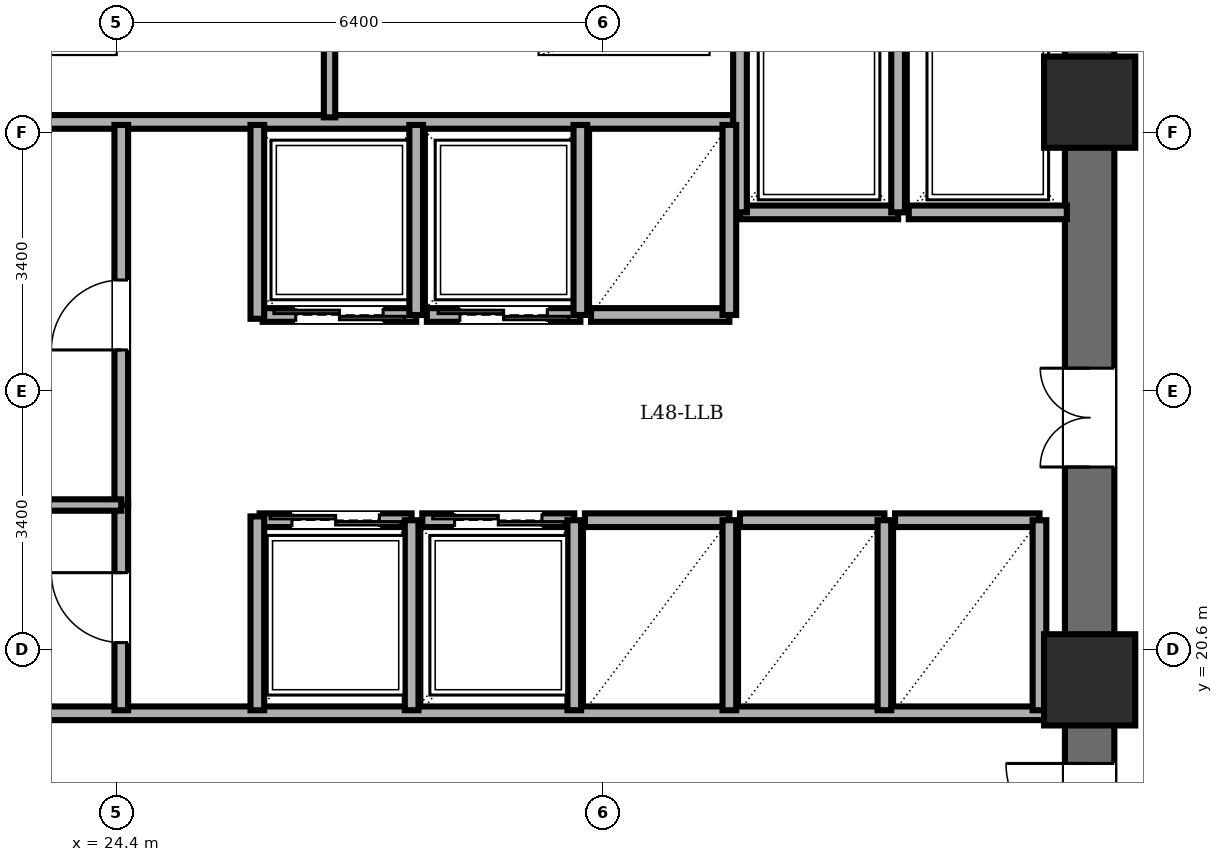
"""IFC4 building model, lengths in metres.
Left out: names, types, materials, properties, quantities, classifications, styles, units other than length and angle.
Written with IfcOpenShell. Run it as: python <this file> out.ifc"""

import sys

from ifc_helpers import new_model, si_unit, direction, frame, frame_2d, origin, origin_2d, place, context, subcontext, project, spatial, rectangle, extrude, element, fill, save


model = new_model("IFC4")
c1 = context("Model", 3, precision=1e-05, world=origin(), true_north=direction((0.0, 1.0)))
c2 = subcontext(c1, "Body", "Model", "MODEL_VIEW")
j1 = project(units=[si_unit("LENGTHUNIT", "METRE"), si_unit("PLANEANGLEUNIT", "RADIAN")], contexts=[c1])
p1 = place(None, origin())
s1 = spatial("IfcSite", under=j1, at=p1, CompositionType="ELEMENT")
p2 = place(p1, origin())
s2 = spatial("IfcBuilding", under=s1, at=p2, CompositionType="ELEMENT")
p3 = place(p2, frame((0.0, 0.0, 183.4)))
s3 = spatial("IfcBuildingStorey", under=s2, at=p3, CompositionType="ELEMENT", Elevation=183.4)
for number, where, z_axis, x_axis in (
    (1, (37.2, 20.2, 0.0), (0.0, 0.0, 1.0), (1.0, 0.0, 0.0)),
    (2, (37.2, 27.8, 0.0), (0.0, 0.0, 1.0), (1.0, 0.0, 0.0)),
):
    element("IfcColumn", number, at=place(p3, frame(where, z_axis=z_axis, x_axis=x_axis)), inside=s3, PredefinedType="COLUMN", context=c2, shape_type="SweptSolid", body=[
        extrude(rectangle(XDim=1.2, YDim=1.2, at=origin_2d()), origin(), (0.0, 0.0, 1.0), 3.6),
    ])
p4 = place(p3, frame((37.2, 14.4, 0.0), z_axis=(0.0, 0.0, 1.0), x_axis=(0.0, 1.0, 0.0)))
e3 = element("IfcWall", 3, at=p4, inside=s3, PredefinedType="SHEAR", context=c2, shape_type="SweptSolid", body=[
    extrude(rectangle(XDim=19.2, YDim=0.65, at=frame_2d((9.6, 0.0))), origin(), (0.0, 0.0, 1.0), 3.4),
])
p5 = place(p4, frame((15.8, 0.0, 0.0)))
e4 = element("IfcOpeningElement", 4, at=p5, cuts=e3, PredefinedType="OPENING", context=c2, shape_type="SweptSolid", body=[
    extrude(rectangle(XDim=1.15, YDim=2.15, at=frame_2d((0.575, 1.075))), frame((0.0, 0.335, 0.0), z_axis=(0.0, -1.0, 0.0), x_axis=(1.0, 0.0, 0.0)), (0.0, 0.0, 1.0), 0.67),
])
p6 = place(p4, frame((3.6, 0.0, 0.0)))
e5 = element("IfcOpeningElement", 5, at=p6, cuts=e3, PredefinedType="OPENING", context=c2, shape_type="SweptSolid", body=[
    extrude(rectangle(XDim=1.1, YDim=2.15, at=frame_2d((0.55, 1.075))), frame((0.0, 0.335, 0.0), z_axis=(0.0, -1.0, 0.0), x_axis=(1.0, 0.0, 0.0)), (0.0, 0.0, 1.0), 0.67),
])
p7 = place(p4, frame((8.6, 0.0, 0.0)))
e6 = element("IfcOpeningElement", 6, at=p7, cuts=e3, PredefinedType="OPENING", context=c2, shape_type="SweptSolid", body=[
    extrude(rectangle(XDim=1.3, YDim=2.2, at=frame_2d((0.65, 1.1))), frame((0.0, 0.335, 0.0), z_axis=(0.0, -1.0, 0.0), x_axis=(1.0, 0.0, 0.0)), (0.0, 0.0, 1.0), 0.67),
])
p8 = place(p3, frame((21.95, 27.54, 0.0), z_axis=(0.0, 0.0, 1.0), x_axis=(1.0, 0.0, 0.0)))
e7 = element("IfcWall", 7, at=p8, inside=s3, PredefinedType="PARTITIONING", context=c2, shape_type="SweptSolid", body=[
    extrude(rectangle(XDim=10.56, YDim=0.18, at=frame_2d((5.28, 0.0))), origin(), (0.0, 0.0, 1.0), 3.4),
])
p9 = place(p3, frame((27.2, 27.6, 0.0), z_axis=(0.0, 0.0, 1.0), x_axis=(0.0, 1.0, 0.0)))
e8 = element("IfcWall", 8, at=p9, inside=s3, PredefinedType="PARTITIONING", context=c2, shape_type="SweptSolid", body=[
    extrude(rectangle(XDim=1.52, YDim=0.15, at=frame_2d((0.76, 0.0))), origin(), (0.0, 0.0, 1.0), 3.4),
])
p10 = place(p3, frame((21.95, 19.76, 0.0), z_axis=(0.0, 0.0, 1.0), x_axis=(1.0, 0.0, 0.0)))
e9 = element("IfcWall", 9, at=p10, inside=s3, PredefinedType="PARTITIONING", context=c2, shape_type="SweptSolid", body=[
    extrude(rectangle(XDim=14.87, YDim=0.18, at=frame_2d((7.435, 0.0))), origin(), (0.0, 0.0, 1.0), 3.4),
])
p11 = place(p3, frame((34.68, 26.35, 0.0), z_axis=(0.0, 0.0, 1.0), x_axis=(-1.0, 0.0, 0.0)))
e10 = element("IfcWall", 10, at=p11, inside=s3, PredefinedType="PARTITIONING", context=c2, shape_type="SweptSolid", body=[
    extrude(rectangle(XDim=2.08, YDim=0.18, at=frame_2d((1.04, 0.0))), origin(), (0.0, 0.0, 1.0), 3.4),
])
for number, where, z_axis, x_axis in (
    (11, (34.68, 26.35, 0.0), (0.0, 0.0, 1.0), (0.0, 1.0, 0.0)),
    (12, (32.6, 29.08, 0.0), (0.0, 0.0, 1.0), (0.0, -1.0, 0.0)),
):
    element("IfcWall", number, at=place(p3, frame(where, z_axis=z_axis, x_axis=x_axis)), inside=s3, PredefinedType="PARTITIONING", context=c2, shape_type="SweptSolid", body=[
        extrude(rectangle(XDim=2.73, YDim=0.18, at=frame_2d((1.365, 0.0))), origin(), (0.0, 0.0, 1.0), 3.4),
    ])
p12 = place(p3, frame((36.9, 26.35, 0.0), z_axis=(0.0, 0.0, 1.0), x_axis=(-1.0, 0.0, 0.0)))
e13 = element("IfcWall", 13, at=p12, inside=s3, PredefinedType="PARTITIONING", context=c2, shape_type="SweptSolid", body=[
    extrude(rectangle(XDim=2.08, YDim=0.18, at=frame_2d((1.04, 0.0))), origin(), (0.0, 0.0, 1.0), 3.4),
])
p13 = place(p3, frame((28.34, 25.0, 0.0), z_axis=(0.0, 0.0, 1.0), x_axis=(-1.0, 0.0, 0.0)))
e14 = element("IfcWall", 14, at=p13, inside=s3, PredefinedType="PARTITIONING", context=c2, shape_type="SweptSolid", body=[
    extrude(rectangle(XDim=2.02, YDim=0.18, at=frame_2d((1.01, 0.0))), origin(), (0.0, 0.0, 1.0), 3.4),
])
p14 = place(p13, frame((0.435, 0.0, 0.0)))
e15 = element("IfcOpeningElement", 15, at=p14, cuts=e14, PredefinedType="OPENING", context=c2, shape_type="SweptSolid", body=[
    extrude(rectangle(XDim=1.15, YDim=2.2, at=frame_2d((0.575, 1.1))), frame((0.0, 0.1, 0.0), z_axis=(0.0, -1.0, 0.0), x_axis=(1.0, 0.0, 0.0)), (0.0, 0.0, 1.0), 0.2),
])
p15 = place(p3, frame((28.34, 25.0, 0.0), z_axis=(0.0, 0.0, 1.0), x_axis=(0.0, 1.0, 0.0)))
e16 = element("IfcWall", 16, at=p15, inside=s3, PredefinedType="PARTITIONING", context=c2, shape_type="SweptSolid", body=[
    extrude(rectangle(XDim=2.5, YDim=0.18, at=frame_2d((1.25, 0.0))), origin(), (0.0, 0.0, 1.0), 3.4),
])
p16 = place(p3, frame((30.5, 25.0, 0.0), z_axis=(0.0, 0.0, 1.0), x_axis=(-1.0, 0.0, 0.0)))
e17 = element("IfcWall", 17, at=p16, inside=s3, PredefinedType="PARTITIONING", context=c2, shape_type="SweptSolid", body=[
    extrude(rectangle(XDim=2.02, YDim=0.18, at=frame_2d((1.01, 0.0))), origin(), (0.0, 0.0, 1.0), 3.4),
])
p17 = place(p16, frame((0.435, 0.0, 0.0)))
e18 = element("IfcOpeningElement", 18, at=p17, cuts=e17, PredefinedType="OPENING", context=c2, shape_type="SweptSolid", body=[
    extrude(rectangle(XDim=1.15, YDim=2.2, at=frame_2d((0.575, 1.1))), frame((0.0, 0.1, 0.0), z_axis=(0.0, -1.0, 0.0), x_axis=(1.0, 0.0, 0.0)), (0.0, 0.0, 1.0), 0.2),
])
p18 = place(p3, frame((30.5, 25.0, 0.0), z_axis=(0.0, 0.0, 1.0), x_axis=(0.0, 1.0, 0.0)))
e19 = element("IfcWall", 19, at=p18, inside=s3, PredefinedType="PARTITIONING", context=c2, shape_type="SweptSolid", body=[
    extrude(rectangle(XDim=2.5, YDim=0.18, at=frame_2d((1.25, 0.0))), origin(), (0.0, 0.0, 1.0), 3.4),
])
p19 = place(p3, frame((26.28, 22.3, 0.0), z_axis=(0.0, 0.0, 1.0), x_axis=(1.0, 0.0, 0.0)))
e20 = element("IfcWall", 20, at=p19, inside=s3, PredefinedType="PARTITIONING", context=c2, shape_type="SweptSolid", body=[
    extrude(rectangle(XDim=2.0, YDim=0.18, at=frame_2d((1.0, 0.0))), origin(), (0.0, 0.0, 1.0), 3.4),
])
p20 = place(p19, frame((0.425, 0.0, 0.0)))
e21 = element("IfcOpeningElement", 21, at=p20, cuts=e20, PredefinedType="OPENING", context=c2, shape_type="SweptSolid", body=[
    extrude(rectangle(XDim=1.15, YDim=2.2, at=frame_2d((0.575, 1.1))), frame((0.0, 0.1, 0.0), z_axis=(0.0, -1.0, 0.0), x_axis=(1.0, 0.0, 0.0)), (0.0, 0.0, 1.0), 0.2),
])
p21 = place(p3, frame((28.28, 19.8, 0.0), z_axis=(0.0, 0.0, 1.0), x_axis=(0.0, 1.0, 0.0)))
e22 = element("IfcWall", 22, at=p21, inside=s3, PredefinedType="PARTITIONING", context=c2, shape_type="SweptSolid", body=[
    extrude(rectangle(XDim=2.5, YDim=0.18, at=frame_2d((1.25, 0.0))), origin(), (0.0, 0.0, 1.0), 3.4),
])
p22 = place(p3, frame((28.42, 22.3, 0.0), z_axis=(0.0, 0.0, 1.0), x_axis=(1.0, 0.0, 0.0)))
e23 = element("IfcWall", 23, at=p22, inside=s3, PredefinedType="PARTITIONING", context=c2, shape_type="SweptSolid", body=[
    extrude(rectangle(XDim=2.0, YDim=0.18, at=frame_2d((1.0, 0.0))), origin(), (0.0, 0.0, 1.0), 3.4),
])
p23 = place(p22, frame((0.425, 0.0, 0.0)))
e24 = element("IfcOpeningElement", 24, at=p23, cuts=e23, PredefinedType="OPENING", context=c2, shape_type="SweptSolid", body=[
    extrude(rectangle(XDim=1.15, YDim=2.2, at=frame_2d((0.575, 1.1))), frame((0.0, 0.1, 0.0), z_axis=(0.0, -1.0, 0.0), x_axis=(1.0, 0.0, 0.0)), (0.0, 0.0, 1.0), 0.2),
])
p24 = place(p3, frame((30.42, 19.8, 0.0), z_axis=(0.0, 0.0, 1.0), x_axis=(0.0, 1.0, 0.0)))
e25 = element("IfcWall", 25, at=p24, inside=s3, PredefinedType="PARTITIONING", context=c2, shape_type="SweptSolid", body=[
    extrude(rectangle(XDim=2.5, YDim=0.18, at=frame_2d((1.25, 0.0))), origin(), (0.0, 0.0, 1.0), 3.4),
])
p25 = place(p3, frame((32.46, 25.0, 0.0), z_axis=(0.0, 0.0, 1.0), x_axis=(-1.0, 0.0, 0.0)))
e26 = element("IfcWall", 26, at=p25, inside=s3, PredefinedType="PARTITIONING", context=c2, shape_type="SweptSolid", body=[
    extrude(rectangle(XDim=1.82, YDim=0.18, at=frame_2d((0.91, 0.0))), origin(), (0.0, 0.0, 1.0), 3.4),
])
p26 = place(p3, frame((32.46, 25.0, 0.0), z_axis=(0.0, 0.0, 1.0), x_axis=(0.0, 1.0, 0.0)))
e27 = element("IfcWall", 27, at=p26, inside=s3, PredefinedType="PARTITIONING", context=c2, shape_type="SweptSolid", body=[
    extrude(rectangle(XDim=2.5, YDim=0.18, at=frame_2d((1.25, 0.0))), origin(), (0.0, 0.0, 1.0), 3.4),
])
p27 = place(p3, frame((30.56, 22.3, 0.0), z_axis=(0.0, 0.0, 1.0), x_axis=(1.0, 0.0, 0.0)))
e28 = element("IfcWall", 28, at=p27, inside=s3, PredefinedType="PARTITIONING", context=c2, shape_type="SweptSolid", body=[
    extrude(rectangle(XDim=1.9, YDim=0.18, at=frame_2d((0.95, 0.0))), origin(), (0.0, 0.0, 1.0), 3.4),
])
p28 = place(p3, frame((32.46, 19.8, 0.0), z_axis=(0.0, 0.0, 1.0), x_axis=(0.0, 1.0, 0.0)))
e29 = element("IfcWall", 29, at=p28, inside=s3, PredefinedType="PARTITIONING", context=c2, shape_type="SweptSolid", body=[
    extrude(rectangle(XDim=2.5, YDim=0.18, at=frame_2d((1.25, 0.0))), origin(), (0.0, 0.0, 1.0), 3.4),
])
p29 = place(p3, frame((32.6, 22.3, 0.0), z_axis=(0.0, 0.0, 1.0), x_axis=(1.0, 0.0, 0.0)))
e30 = element("IfcWall", 30, at=p29, inside=s3, PredefinedType="PARTITIONING", context=c2, shape_type="SweptSolid", body=[
    extrude(rectangle(XDim=1.9, YDim=0.18, at=frame_2d((0.95, 0.0))), origin(), (0.0, 0.0, 1.0), 3.4),
])
p30 = place(p3, frame((34.5, 19.8, 0.0), z_axis=(0.0, 0.0, 1.0), x_axis=(0.0, 1.0, 0.0)))
e31 = element("IfcWall", 31, at=p30, inside=s3, PredefinedType="PARTITIONING", context=c2, shape_type="SweptSolid", body=[
    extrude(rectangle(XDim=2.5, YDim=0.18, at=frame_2d((1.25, 0.0))), origin(), (0.0, 0.0, 1.0), 3.4),
])
p31 = place(p3, frame((34.64, 22.3, 0.0), z_axis=(0.0, 0.0, 1.0), x_axis=(1.0, 0.0, 0.0)))
e32 = element("IfcWall", 32, at=p31, inside=s3, PredefinedType="PARTITIONING", context=c2, shape_type="SweptSolid", body=[
    extrude(rectangle(XDim=1.9, YDim=0.18, at=frame_2d((0.95, 0.0))), origin(), (0.0, 0.0, 1.0), 3.4),
])
p32 = place(p3, frame((36.54, 19.8, 0.0), z_axis=(0.0, 0.0, 1.0), x_axis=(0.0, 1.0, 0.0)))
e33 = element("IfcWall", 33, at=p32, inside=s3, PredefinedType="PARTITIONING", context=c2, shape_type="SweptSolid", body=[
    extrude(rectangle(XDim=2.5, YDim=0.18, at=frame_2d((1.25, 0.0))), origin(), (0.0, 0.0, 1.0), 3.4),
])
p33 = place(p3, frame((24.46, 22.5, 0.0), z_axis=(0.0, 0.0, 1.0), x_axis=(0.0, 1.0, 0.0)))
e34 = element("IfcWall", 34, at=p33, inside=s3, PredefinedType="PARTITIONING", context=c2, shape_type="SweptSolid", body=[
    extrude(rectangle(XDim=5.0, YDim=0.18, at=frame_2d((2.5, 0.0))), origin(), (0.0, 0.0, 1.0), 3.4),
])
p34 = place(p33, frame((2.04, 0.0, 0.0)))
e35 = element("IfcOpeningElement", 35, at=p34, cuts=e34, PredefinedType="OPENING", context=c2, shape_type="SweptSolid", body=[
    extrude(rectangle(XDim=0.92, YDim=2.1, at=frame_2d((0.46, 1.05))), frame((0.0, 0.1, 0.0), z_axis=(0.0, -1.0, 0.0), x_axis=(1.0, 0.0, 0.0)), (0.0, 0.0, 1.0), 0.2),
])
p35 = place(p3, frame((24.46, 19.8, 0.0), z_axis=(0.0, 0.0, 1.0), x_axis=(0.0, 1.0, 0.0)))
e36 = element("IfcWall", 36, at=p35, inside=s3, PredefinedType="PARTITIONING", context=c2, shape_type="SweptSolid", body=[
    extrude(rectangle(XDim=2.7, YDim=0.18, at=frame_2d((1.35, 0.0))), origin(), (0.0, 0.0, 1.0), 3.4),
])
p36 = place(p35, frame((0.89, 0.0, 0.0)))
e37 = element("IfcOpeningElement", 37, at=p36, cuts=e36, PredefinedType="OPENING", context=c2, shape_type="SweptSolid", body=[
    extrude(rectangle(XDim=0.92, YDim=2.1, at=frame_2d((0.46, 1.05))), frame((0.0, 0.1, 0.0), z_axis=(0.0, -1.0, 0.0), x_axis=(1.0, 0.0, 0.0)), (0.0, 0.0, 1.0), 0.2),
])
p37 = place(p3, frame((21.95, 22.5, 0.0), z_axis=(0.0, 0.0, 1.0), x_axis=(1.0, 0.0, 0.0)))
e38 = element("IfcWall", 38, at=p37, inside=s3, PredefinedType="PARTITIONING", context=c2, shape_type="SweptSolid", body=[
    extrude(rectangle(XDim=2.51, YDim=0.15, at=frame_2d((1.255, 0.0))), origin(), (0.0, 0.0, 1.0), 3.4),
])
for number, where, z_axis, x_axis in (
    (39, (26.25, 24.95, 0.0), (0.0, 0.0, 1.0), (0.0, 1.0, 0.0)),
    (40, (26.25, 19.8, 0.0), (0.0, 0.0, 1.0), (0.0, 1.0, 0.0)),
):
    element("IfcWall", number, at=place(p3, frame(where, z_axis=z_axis, x_axis=x_axis)), inside=s3, PredefinedType="PARTITIONING", context=c2, shape_type="SweptSolid", body=[
        extrude(rectangle(XDim=2.55, YDim=0.18, at=frame_2d((1.275, 0.0))), origin(), (0.0, 0.0, 1.0), 3.4),
    ])
p38 = place(p6, origin())
e41 = element("IfcDoor", 41, at=p38, inside=s3, OperationType="SINGLE_SWING_RIGHT", PredefinedType="DOOR", context=c2, shape_type="SweptSolid", body=[
    extrude(rectangle(XDim=1.1, YDim=2.15, at=frame_2d((0.55, 1.075))), frame((0.0, 0.025, 0.0), z_axis=(0.0, -1.0, 0.0), x_axis=(1.0, 0.0, 0.0)), (0.0, 0.0, 1.0), 0.05),
])
fill(e5, e41)
p39 = place(p14, origin())
e42 = element("IfcDoor", 42, at=p39, inside=s3, OperationType="DOUBLE_DOOR_SLIDING", PredefinedType="DOOR", context=c2, shape_type="SweptSolid", body=[
    extrude(rectangle(XDim=1.15, YDim=2.2, at=frame_2d((0.575, 1.1))), frame((0.0, 0.025, 0.0), z_axis=(0.0, -1.0, 0.0), x_axis=(1.0, 0.0, 0.0)), (0.0, 0.0, 1.0), 0.05),
])
fill(e15, e42)
p40 = place(p17, origin())
e43 = element("IfcDoor", 43, at=p40, inside=s3, OperationType="DOUBLE_DOOR_SLIDING", PredefinedType="DOOR", context=c2, shape_type="SweptSolid", body=[
    extrude(rectangle(XDim=1.15, YDim=2.2, at=frame_2d((0.575, 1.1))), frame((0.0, 0.025, 0.0), z_axis=(0.0, -1.0, 0.0), x_axis=(1.0, 0.0, 0.0)), (0.0, 0.0, 1.0), 0.05),
])
fill(e18, e43)
p41 = place(p20, origin())
e44 = element("IfcDoor", 44, at=p41, inside=s3, OperationType="DOUBLE_DOOR_SLIDING", PredefinedType="DOOR", context=c2, shape_type="SweptSolid", body=[
    extrude(rectangle(XDim=1.15, YDim=2.2, at=frame_2d((0.575, 1.1))), frame((0.0, 0.025, 0.0), z_axis=(0.0, -1.0, 0.0), x_axis=(1.0, 0.0, 0.0)), (0.0, 0.0, 1.0), 0.05),
])
fill(e21, e44)
p42 = place(p23, origin())
e45 = element("IfcDoor", 45, at=p42, inside=s3, OperationType="DOUBLE_DOOR_SLIDING", PredefinedType="DOOR", context=c2, shape_type="SweptSolid", body=[
    extrude(rectangle(XDim=1.15, YDim=2.2, at=frame_2d((0.575, 1.1))), frame((0.0, 0.025, 0.0), z_axis=(0.0, -1.0, 0.0), x_axis=(1.0, 0.0, 0.0)), (0.0, 0.0, 1.0), 0.05),
])
fill(e24, e45)
p43 = place(p34, origin())
e46 = element("IfcDoor", 46, at=p43, inside=s3, OperationType="SINGLE_SWING_LEFT", PredefinedType="DOOR", context=c2, shape_type="SweptSolid", body=[
    extrude(rectangle(XDim=0.92, YDim=2.1, at=frame_2d((0.46, 1.05))), frame((0.0, 0.025, 0.0), z_axis=(0.0, -1.0, 0.0), x_axis=(1.0, 0.0, 0.0)), (0.0, 0.0, 1.0), 0.05),
])
fill(e35, e46)
p44 = place(p36, origin())
e47 = element("IfcDoor", 47, at=p44, inside=s3, OperationType="SINGLE_SWING_RIGHT", PredefinedType="DOOR", context=c2, shape_type="SweptSolid", body=[
    extrude(rectangle(XDim=0.92, YDim=2.1, at=frame_2d((0.46, 1.05))), frame((0.0, 0.025, 0.0), z_axis=(0.0, -1.0, 0.0), x_axis=(1.0, 0.0, 0.0)), (0.0, 0.0, 1.0), 0.05),
])
fill(e37, e47)
p45 = place(p7, origin())
e48 = element("IfcDoor", 48, at=p45, inside=s3, OperationType="DOUBLE_DOOR_SINGLE_SWING", PredefinedType="DOOR", context=c2, shape_type="SweptSolid", body=[
    extrude(rectangle(XDim=1.3, YDim=2.2, at=frame_2d((0.65, 1.1))), frame((0.0, 0.025, 0.0), z_axis=(0.0, -1.0, 0.0), x_axis=(1.0, 0.0, 0.0)), (0.0, 0.0, 1.0), 0.05),
])
fill(e6, e48)
save(model, sys.argv[1])
